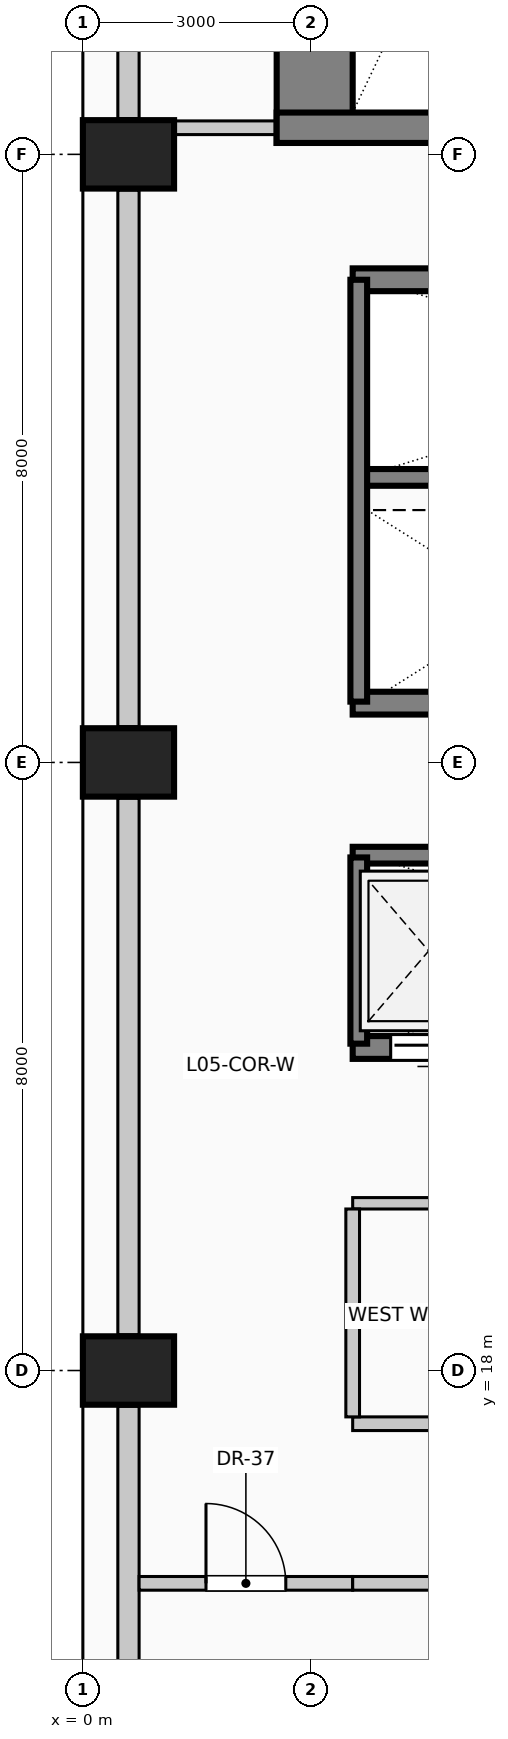
"""IFC4 building model, lengths in metres.
Left out: names, types, materials, properties, quantities, classifications, styles, units other than length and angle.
Written with IfcOpenShell. Run it as: python <this file> out.ifc"""

import sys

from ifc_helpers import new_model, si_unit, direction, frame, frame_2d, origin, origin_2d, place, context, subcontext, project, spatial, rectangle, extrude, element, fill, save


model = new_model("IFC4")
c1 = context("Model", 3, precision=1e-05, world=origin(), true_north=direction((0.0, 1.0)))
c2 = subcontext(c1, "Body", "Model", "MODEL_VIEW")
j1 = project(units=[si_unit("LENGTHUNIT", "METRE"), si_unit("PLANEANGLEUNIT", "RADIAN")], contexts=[c1])
p1 = place(None, origin())
s1 = spatial("IfcSite", under=j1, at=p1, CompositionType="ELEMENT")
p2 = place(p1, origin())
s2 = spatial("IfcBuilding", under=s1, at=p2, CompositionType="ELEMENT")
p3 = place(p2, frame((0.0, 0.0, 22.6)))
s3 = spatial("IfcBuildingStorey", under=s2, at=p3, CompositionType="ELEMENT", Elevation=22.6)
p4 = place(p3, frame((3.05, 34.15, 0.0), z_axis=(0.0, 0.0, 1.0), x_axis=(0.0, 1.0, 0.0)))
e1 = element("IfcWall", 1, at=p4, inside=s3, PredefinedType="SHEAR", context=c2, shape_type="SweptSolid", body=[
    extrude(rectangle(XDim=9.28, YDim=1.0, at=frame_2d((4.64, 0.0))), origin(), (0.0, 0.0, 1.0), 4.0),
])
p5 = place(p3, frame((2.55, 34.35, 0.0), z_axis=(0.0, 0.0, 1.0), x_axis=(1.0, 0.0, 0.0)))
e2 = element("IfcWall", 2, at=p5, inside=s3, PredefinedType="SHEAR", context=c2, shape_type="SweptSolid", body=[
    extrude(rectangle(XDim=5.16, YDim=0.4, at=frame_2d((2.58, 0.0))), origin(), (0.0, 0.0, 1.0), 4.0),
])
p6 = place(p5, frame((2.4, 0.0, 0.0)))
e3 = element("IfcOpeningElement", 3, at=p6, cuts=e2, PredefinedType="OPENING", context=c2, shape_type="SweptSolid", body=[
    extrude(rectangle(XDim=1.15, YDim=2.2, at=frame_2d((0.575, 1.1))), frame((0.0, 0.21, 0.0), z_axis=(0.0, -1.0, 0.0), x_axis=(1.0, 0.0, 0.0)), (0.0, 0.0, 1.0), 0.42),
])
for number, where, z_axis, x_axis in (
    (4, (0.6, 18.0, 0.0), (0.0, 0.0, 1.0), (0.0, 1.0, 0.0)),
    (5, (0.6, 26.0, 0.0), (0.0, 0.0, 1.0), (0.0, 1.0, 0.0)),
    (6, (0.6, 34.0, 0.0), (0.0, 0.0, 1.0), (0.0, 1.0, 0.0)),
):
    element("IfcColumn", number, at=place(p3, frame(where, z_axis=z_axis, x_axis=x_axis)), inside=s3, PredefinedType="COLUMN", context=c2, shape_type="SweptSolid", body=[
        extrude(rectangle(XDim=0.9, YDim=1.2, at=origin_2d()), origin(), (0.0, 0.0, 1.0), 4.0),
    ])
p7 = place(p3, frame((0.6, 10.47, 0.0), z_axis=(0.0, 0.0, 1.0), x_axis=(0.0, 1.0, 0.0)))
e7 = element("IfcWall", 7, at=p7, inside=s3, PredefinedType="SOLIDWALL", context=c2, shape_type="SweptSolid", body=[
    extrude(rectangle(XDim=7.06, YDim=0.28, at=frame_2d((3.53, 0.0))), origin(), (0.0, 0.0, 1.0), 2.85),
])
p8 = place(p7, frame((0.887, 0.0, 0.42)))
e8 = element("IfcOpeningElement", 8, at=p8, cuts=e7, PredefinedType="OPENING", context=c2, shape_type="SweptSolid", body=[
    extrude(rectangle(XDim=2.2, YDim=1.95, at=frame_2d((1.1, 0.975))), frame((0.0, 0.15, 0.0), z_axis=(0.0, -1.0, 0.0), x_axis=(1.0, 0.0, 0.0)), (0.0, 0.0, 1.0), 0.3),
])
for number, where, z_axis, x_axis in (
    (9, (0.6, 18.47, 0.0), (0.0, 0.0, 1.0), (0.0, 1.0, 0.0)),
    (10, (0.6, 26.47, 0.0), (0.0, 0.0, 1.0), (0.0, 1.0, 0.0)),
):
    element("IfcWall", number, at=place(p3, frame(where, z_axis=z_axis, x_axis=x_axis)), inside=s3, PredefinedType="SOLIDWALL", context=c2, shape_type="SweptSolid", body=[
        extrude(rectangle(XDim=7.06, YDim=0.28, at=frame_2d((3.53, 0.0))), origin(), (0.0, 0.0, 1.0), 2.85),
    ])
p9 = place(p3, frame((0.6, 34.47, 0.0), z_axis=(0.0, 0.0, 1.0), x_axis=(0.0, 1.0, 0.0)))
e11 = element("IfcWall", 11, at=p9, inside=s3, PredefinedType="SOLIDWALL", context=c2, shape_type="SweptSolid", body=[
    extrude(rectangle(XDim=7.46, YDim=0.28, at=frame_2d((3.73, 0.0))), origin(), (0.0, 0.0, 1.0), 2.85),
])
p10 = place(p3, frame((5.65, 22.25, 0.0), z_axis=(0.0, 0.0, 1.0), x_axis=(-1.0, 0.0, 0.0)))
e12 = element("IfcWall", 12, at=p10, inside=s3, PredefinedType="SOLIDWALL", context=c2, shape_type="SweptSolid", body=[
    extrude(rectangle(XDim=2.1, YDim=0.3, at=frame_2d((1.05, 0.0))), origin(), (0.0, 0.0, 1.0), 4.0),
])
p11 = place(p10, frame((0.5, 0.0, 0.0)))
e13 = element("IfcOpeningElement", 13, at=p11, cuts=e12, PredefinedType="OPENING", context=c2, shape_type="SweptSolid", body=[
    extrude(rectangle(XDim=1.1, YDim=2.2, at=frame_2d((0.55, 1.1))), frame((0.0, 0.16, 0.0), z_axis=(0.0, -1.0, 0.0), x_axis=(1.0, 0.0, 0.0)), (0.0, 0.0, 1.0), 0.32),
])
for number, where, z_axis, x_axis in (
    (14, (3.55, 32.35, 0.0), (0.0, 0.0, 1.0), (1.0, 0.0, 0.0)),
    (15, (5.65, 26.78, 0.0), (0.0, 0.0, 1.0), (-1.0, 0.0, 0.0)),
):
    element("IfcWall", number, at=place(p3, frame(where, z_axis=z_axis, x_axis=x_axis)), inside=s3, PredefinedType="SOLIDWALL", context=c2, shape_type="SweptSolid", body=[
        extrude(rectangle(XDim=2.1, YDim=0.3, at=frame_2d((1.05, 0.0))), origin(), (0.0, 0.0, 1.0), 4.0),
    ])
p12 = place(p3, frame((3.55, 29.75, 0.0), z_axis=(0.0, 0.0, 1.0), x_axis=(1.0, 0.0, 0.0)))
e16 = element("IfcWall", 16, at=p12, inside=s3, PredefinedType="SOLIDWALL", context=c2, shape_type="SweptSolid", body=[
    extrude(rectangle(XDim=8.65, YDim=0.22, at=frame_2d((4.325, 0.0))), origin(), (0.0, 0.0, 1.0), 4.0),
])
p13 = place(p3, frame((3.63, 26.8, 0.0), z_axis=(0.0, 0.0, 1.0), x_axis=(0.0, 1.0, 0.0)))
e17 = element("IfcWall", 17, at=p13, inside=s3, PredefinedType="SOLIDWALL", context=c2, shape_type="SweptSolid", body=[
    extrude(rectangle(XDim=5.55, YDim=0.22, at=frame_2d((2.775, 0.0))), origin(), (0.0, 0.0, 1.0), 4.0),
])
p14 = place(p3, frame((3.55, 24.78, 0.0), z_axis=(0.0, 0.0, 1.0), x_axis=(1.0, 0.0, 0.0)))
e18 = element("IfcWall", 18, at=p14, inside=s3, PredefinedType="SOLIDWALL", context=c2, shape_type="SweptSolid", body=[
    extrude(rectangle(XDim=8.65, YDim=0.22, at=frame_2d((4.325, 0.0))), origin(), (0.0, 0.0, 1.0), 4.0),
])
p15 = place(p3, frame((3.63, 22.3, 0.0), z_axis=(0.0, 0.0, 1.0), x_axis=(0.0, 1.0, 0.0)))
e19 = element("IfcWall", 19, at=p15, inside=s3, PredefinedType="SOLIDWALL", context=c2, shape_type="SweptSolid", body=[
    extrude(rectangle(XDim=2.45, YDim=0.22, at=frame_2d((1.225, 0.0))), origin(), (0.0, 0.0, 1.0), 4.0),
])
p16 = place(p3, frame((0.74, 15.2, 0.0), z_axis=(0.0, 0.0, 1.0), x_axis=(1.0, 0.0, 0.0)))
e20 = element("IfcWall", 20, at=p16, inside=s3, PredefinedType="PARTITIONING", context=c2, shape_type="SweptSolid", body=[
    extrude(rectangle(XDim=2.81, YDim=0.18, at=frame_2d((1.405, 0.0))), origin(), (0.0, 0.0, 1.0), 3.7),
])
p17 = place(p16, frame((0.88, 0.0, 0.0)))
e21 = element("IfcOpeningElement", 21, at=p17, cuts=e20, PredefinedType="OPENING", context=c2, shape_type="SweptSolid", body=[
    extrude(rectangle(XDim=1.05, YDim=2.15, at=frame_2d((0.525, 1.075))), frame((0.0, 0.1, 0.0), z_axis=(0.0, -1.0, 0.0), x_axis=(1.0, 0.0, 0.0)), (0.0, 0.0, 1.0), 0.2),
])
p18 = place(p3, frame((3.55, 15.2, 0.0), z_axis=(0.0, 0.0, 1.0), x_axis=(1.0, 0.0, 0.0)))
e22 = element("IfcWall", 22, at=p18, inside=s3, PredefinedType="PARTITIONING", context=c2, shape_type="SweptSolid", body=[
    extrude(rectangle(XDim=5.65, YDim=0.18, at=frame_2d((2.825, 0.0))), origin(), (0.0, 0.0, 1.0), 3.7),
])
p19 = place(p3, frame((3.55, 17.3, 0.0), z_axis=(0.0, 0.0, 1.0), x_axis=(1.0, 0.0, 0.0)))
e23 = element("IfcWall", 23, at=p19, inside=s3, PredefinedType="PARTITIONING", context=c2, shape_type="SweptSolid", body=[
    extrude(rectangle(XDim=8.65, YDim=0.18, at=frame_2d((4.325, 0.0))), origin(), (0.0, 0.0, 1.0), 3.7),
])
p20 = place(p19, frame((3.8, 0.0, 0.0)))
e24 = element("IfcOpeningElement", 24, at=p20, cuts=e23, PredefinedType="OPENING", context=c2, shape_type="SweptSolid", body=[
    extrude(rectangle(XDim=1.05, YDim=2.15, at=frame_2d((0.525, 1.075))), frame((0.0, 0.1, 0.0), z_axis=(0.0, -1.0, 0.0), x_axis=(1.0, 0.0, 0.0)), (0.0, 0.0, 1.0), 0.2),
])
p21 = place(p3, frame((3.55, 20.2, 0.0), z_axis=(0.0, 0.0, 1.0), x_axis=(1.0, 0.0, 0.0)))
e25 = element("IfcWall", 25, at=p21, inside=s3, PredefinedType="PARTITIONING", context=c2, shape_type="SweptSolid", body=[
    extrude(rectangle(XDim=8.65, YDim=0.15, at=frame_2d((4.325, 0.0))), origin(), (0.0, 0.0, 1.0), 3.7),
])
p22 = place(p3, frame((1.2, 34.35, 0.0), z_axis=(0.0, 0.0, 1.0), x_axis=(1.0, 0.0, 0.0)))
e26 = element("IfcWall", 26, at=p22, inside=s3, PredefinedType="PARTITIONING", context=c2, shape_type="SweptSolid", body=[
    extrude(rectangle(XDim=1.35, YDim=0.18, at=frame_2d((0.675, 0.0))), origin(), (0.0, 0.0, 1.0), 3.7),
])
p23 = place(p3, frame((3.55, 17.39, 0.0), z_axis=(0.0, 0.0, 1.0), x_axis=(0.0, 1.0, 0.0)))
e27 = element("IfcWall", 27, at=p23, inside=s3, PredefinedType="PARTITIONING", context=c2, shape_type="SweptSolid", body=[
    extrude(rectangle(XDim=2.735, YDim=0.18, at=frame_2d((1.368, 0.0))), origin(), (0.0, 0.0, 1.0), 3.7),
])
p24 = place(p11, origin())
e28 = element("IfcDoor", 28, at=p24, inside=s3, OperationType="SLIDING_TO_LEFT", PredefinedType="DOOR", context=c2, shape_type="SweptSolid", body=[
    extrude(rectangle(XDim=1.1, YDim=2.2, at=frame_2d((0.55, 1.1))), frame((0.0, 0.025, 0.0), z_axis=(0.0, -1.0, 0.0), x_axis=(1.0, 0.0, 0.0)), (0.0, 0.0, 1.0), 0.05),
])
fill(e13, e28)
p25 = place(p17, origin())
e29 = element("IfcDoor", 29, at=p25, inside=s3, OperationType="SINGLE_SWING_LEFT", PredefinedType="DOOR", context=c2, shape_type="SweptSolid", body=[
    extrude(rectangle(XDim=1.05, YDim=2.15, at=frame_2d((0.525, 1.075))), frame((0.0, 0.025, 0.0), z_axis=(0.0, -1.0, 0.0), x_axis=(1.0, 0.0, 0.0)), (0.0, 0.0, 1.0), 0.05),
])
fill(e21, e29)
save(model, sys.argv[1])
